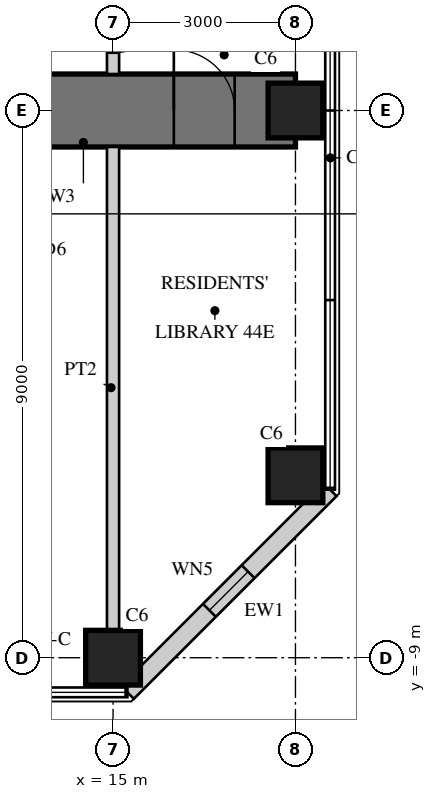
"""IFC4 building model, lengths in metres.
Left out: names, types, materials, properties, quantities, classifications, styles, units other than length and angle.
Written with IfcOpenShell. Run it as: python <this file> out.ifc"""

import sys

from ifc_helpers import new_model, si_unit, direction, frame, frame_2d, origin, origin_2d, place, context, subcontext, project, spatial, rectangle, hollow_rectangle, extrude, element, fill, save


model = new_model("IFC4")
c1 = context("Model", 3, precision=1e-05, world=origin(), true_north=direction((0.0, 1.0)))
c2 = subcontext(c1, "Body", "Model", "MODEL_VIEW")
j1 = project(units=[si_unit("LENGTHUNIT", "METRE"), si_unit("PLANEANGLEUNIT", "RADIAN")], contexts=[c1])
p1 = place(None, origin())
s1 = spatial("IfcSite", under=j1, at=p1, CompositionType="ELEMENT")
p2 = place(p1, origin())
s2 = spatial("IfcBuilding", under=s1, at=p2, CompositionType="ELEMENT")
p3 = place(p2, frame((0.0, 0.0, 179.7)))
s3 = spatial("IfcBuildingStorey", under=s2, at=p3, CompositionType="ELEMENT", Elevation=179.7)
p4 = place(p3, frame((9.0, 0.0, 0.0), z_axis=(0.0, 0.0, 1.0), x_axis=(1.0, 0.0, 0.0)))
e1 = element("IfcWall", 1, at=p4, inside=s3, PredefinedType="SHEAR", context=c2, shape_type="SweptSolid", body=[
    extrude(rectangle(XDim=9.0, YDim=1.2, at=frame_2d((4.5, 0.0))), origin(), (0.0, 0.0, 1.0), 3.4),
])
p5 = place(p4, frame((3.95, 0.0, 0.0)))
e2 = element("IfcOpeningElement", 2, at=p5, cuts=e1, PredefinedType="OPENING", context=c2, shape_type="SweptSolid", body=[
    extrude(rectangle(XDim=1.0, YDim=2.15, at=frame_2d((0.5, 1.075))), frame((0.0, 0.61, 0.0), z_axis=(0.0, -1.0, 0.0), x_axis=(1.0, 0.0, 0.0)), (0.0, 0.0, 1.0), 1.22),
])
p6 = place(p4, frame((7.0, 0.0, 0.0)))
e3 = element("IfcOpeningElement", 3, at=p6, cuts=e1, PredefinedType="OPENING", context=c2, shape_type="SweptSolid", body=[
    extrude(rectangle(XDim=1.0, YDim=2.2, at=frame_2d((0.5, 1.1))), frame((0.0, 0.61, 0.0), z_axis=(0.0, -1.0, 0.0), x_axis=(1.0, 0.0, 0.0)), (0.0, 0.0, 1.0), 1.22),
])
for number, where, z_axis, x_axis in (
    (4, (15.0, -9.0, 0.0), (0.0, 0.0, 1.0), (1.0, 0.0, 0.0)),
    (5, (18.0, -6.0, 0.0), (0.0, 0.0, 1.0), (1.0, 0.0, 0.0)),
    (6, (18.0, 0.0, 0.0), (0.0, 0.0, 1.0), (1.0, 0.0, 0.0)),
):
    element("IfcColumn", number, at=place(p3, frame(where, z_axis=z_axis, x_axis=x_axis)), inside=s3, PredefinedType="COLUMN", context=c2, shape_type="SweptSolid", body=[
        extrude(rectangle(XDim=0.9, YDim=0.9, at=origin_2d()), origin(), (0.0, 0.0, 1.0), 3.4),
    ])
p7 = place(p3, frame((15.236, -9.57, 0.0), z_axis=(0.0, 0.0, 1.0), x_axis=(0.707106781187, 0.707106781187, 0.0)))
e7 = element("IfcWall", 7, at=p7, inside=s3, PredefinedType="SOLIDWALL", context=c2, shape_type="SweptSolid", body=[
    extrude(rectangle(XDim=4.715, YDim=0.3, at=frame_2d((2.357, 0.0))), origin(), (0.0, 0.0, 1.0), 3.22),
])
p8 = place(p7, frame((1.907, 0.0, 0.3)))
e8 = element("IfcOpeningElement", 8, at=p8, cuts=e7, PredefinedType="OPENING", context=c2, shape_type="SweptSolid", body=[
    extrude(rectangle(XDim=0.9, YDim=2.4, at=frame_2d((0.45, 1.2))), frame((0.0, 0.16, 0.0), z_axis=(0.0, -1.0, 0.0), x_axis=(1.0, 0.0, 0.0)), (0.0, 0.0, 1.0), 0.32),
])
p9 = place(p3, frame((15.0, -8.55, 0.0), z_axis=(0.0, 0.0, 1.0), x_axis=(0.0, 1.0, 0.0)))
e9 = element("IfcWall", 9, at=p9, inside=s3, PredefinedType="SOLIDWALL", context=c2, shape_type="SweptSolid", body=[
    extrude(rectangle(XDim=7.95, YDim=0.2, at=frame_2d((3.975, 0.0))), origin(), (0.0, 0.0, 1.0), 2.47),
])
p10 = place(p3, frame((15.0, 0.6, 0.0), z_axis=(0.0, 0.0, 1.0), x_axis=(0.0, 1.0, 0.0)))
e10 = element("IfcWall", 10, at=p10, inside=s3, PredefinedType="SOLIDWALL", context=c2, shape_type="SweptSolid", body=[
    extrude(rectangle(XDim=7.95, YDim=0.2, at=frame_2d((3.975, 0.0))), origin(), (0.0, 0.0, 1.0), 2.47),
])
p11 = place(p10, frame((0.35, 0.0, 0.0)))
e11 = element("IfcOpeningElement", 11, at=p11, cuts=e10, PredefinedType="OPENING", context=c2, shape_type="SweptSolid", body=[
    extrude(rectangle(XDim=1.0, YDim=2.2, at=frame_2d((0.5, 1.1))), frame((0.0, 0.11, 0.0), z_axis=(0.0, -1.0, 0.0), x_axis=(1.0, 0.0, 0.0)), (0.0, 0.0, 1.0), 0.22),
])
p12 = place(p8, origin())
e12 = element("IfcWindow", 12, at=p12, inside=s3, PartitioningType="SINGLE_PANEL", PredefinedType="WINDOW", context=c2, shape_type="SweptSolid", body=[
    extrude(hollow_rectangle(XDim=0.9, YDim=2.4, WallThickness=0.06, at=frame_2d((0.45, 1.2))), frame((0.0, 0.03, 0.0), z_axis=(0.0, -1.0, 0.0), x_axis=(1.0, 0.0, 0.0)), (0.0, 0.0, 1.0), 0.06),
    extrude(rectangle(XDim=0.779, YDim=2.279, at=frame_2d((0.45, 1.2))), frame((0.0, 0.03, 0.0), z_axis=(0.0, -1.0, 0.0), x_axis=(1.0, 0.0, 0.0)), (0.0, 0.0, 1.0), 0.06),
])
fill(e8, e12)
p13 = place(p11, frame((1.0, 0.0, 0.0), z_axis=(0.0, 0.0, 1.0), x_axis=(-1.0, 0.0, 0.0)))
e13 = element("IfcDoor", 13, at=p13, inside=s3, OperationType="SINGLE_SWING_LEFT", PredefinedType="DOOR", context=c2, shape_type="SweptSolid", body=[
    extrude(rectangle(XDim=1.0, YDim=2.2, at=frame_2d((0.5, 1.1))), frame((0.0, 0.025, 0.0), z_axis=(0.0, -1.0, 0.0), x_axis=(1.0, 0.0, 0.0)), (0.0, 0.0, 1.0), 0.05),
])
fill(e11, e13)
p14 = place(p6, origin())
e14 = element("IfcDoor", 14, at=p14, inside=s3, OperationType="SINGLE_SWING_LEFT", PredefinedType="DOOR", context=c2, shape_type="SweptSolid", body=[
    extrude(rectangle(XDim=1.0, YDim=2.2, at=frame_2d((0.5, 1.1))), frame((0.0, 0.025, 0.0), z_axis=(0.0, -1.0, 0.0), x_axis=(1.0, 0.0, 0.0)), (0.0, 0.0, 1.0), 0.05),
])
fill(e3, e14)
save(model, sys.argv[1])
